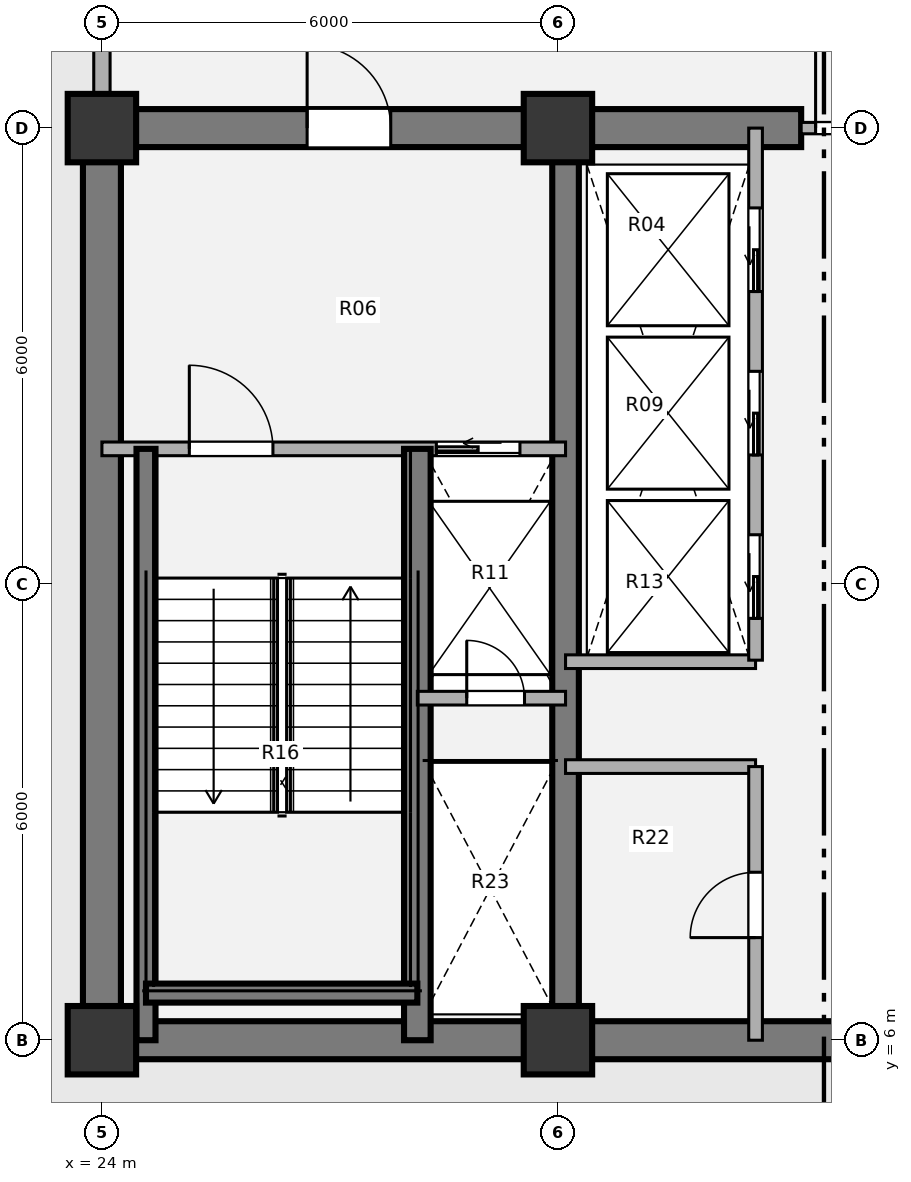
"""IFC4 building model, lengths in metres.
Left out: names, types, materials, properties, quantities, classifications, styles, units other than length and angle.
Written with IfcOpenShell. Run it as: python <this file> out.ifc"""

import sys

from ifc_helpers import new_model, si_unit, direction, frame, frame_2d, origin, origin_2d, place, context, subcontext, project, spatial, rectangle, extrude, source, transform, mapped, element, fill, save


model = new_model("IFC4")
c1 = context("Model", 3, precision=1e-05, world=origin(), true_north=direction((0.0, 1.0)))
c2 = subcontext(c1, "Body", "Model", "MODEL_VIEW")
j1 = project(units=[si_unit("LENGTHUNIT", "METRE"), si_unit("PLANEANGLEUNIT", "RADIAN")], contexts=[c1])
p1 = place(None, origin())
s1 = spatial("IfcSite", under=j1, at=p1, CompositionType="ELEMENT")
p2 = place(p1, origin())
s2 = spatial("IfcBuilding", under=s1, at=p2, CompositionType="ELEMENT")
p3 = place(p2, frame((0.0, 0.0, 85.32)))
s3 = spatial("IfcBuildingStorey", under=s2, at=p3, CompositionType="ELEMENT", Elevation=85.32)
m1 = source(origin(), c2, "Body", "SweptSolid", [
    extrude(rectangle(XDim=0.9, YDim=0.9, at=origin_2d()), origin(), (0.0, 0.0, 1.0), 4.5),
])
for number, where, z_axis, x_axis in (
    (1, (24.0, 6.0, 0.0), (0.0, 0.0, 1.0), (1.0, 0.0, 0.0)),
    (2, (30.0, 6.0, 0.0), (0.0, 0.0, 1.0), (1.0, 0.0, 0.0)),
    (3, (24.0, 18.0, 0.0), (0.0, 0.0, 1.0), (1.0, 0.0, 0.0)),
    (4, (30.0, 18.0, 0.0), (0.0, 0.0, 1.0), (1.0, 0.0, 0.0)),
):
    element("IfcColumn", number, at=place(p3, frame(where, z_axis=z_axis, x_axis=x_axis)), inside=s3, PredefinedType="COLUMN", context=c2, shape_type="MappedRepresentation", body=[
        mapped(m1, transform((0.0, 0.0, 0.0), x_axis=(1.0, 0.0, 0.0), y_axis=(0.0, 1.0, 0.0), z_axis=(0.0, 0.0, 1.0), scale=1.0)),
    ])
p4 = place(p3, frame((48.25, 6.0, 0.0), z_axis=(0.0, 0.0, 1.0), x_axis=(-1.0, 0.0, 0.0)))
e5 = element("IfcWall", 5, at=p4, inside=s3, PredefinedType="SHEAR", context=c2, shape_type="SweptSolid", body=[
    extrude(rectangle(XDim=24.5, YDim=0.5, at=frame_2d((12.25, 0.0))), origin(), (0.0, 0.0, 1.0), 4.5),
])
p5 = place(p3, frame((24.0, 6.0, 0.0), z_axis=(0.0, 0.0, 1.0), x_axis=(0.0, 1.0, 0.0)))
e6 = element("IfcWall", 6, at=p5, inside=s3, PredefinedType="SHEAR", context=c2, shape_type="SweptSolid", body=[
    extrude(rectangle(XDim=12.0, YDim=0.5, at=frame_2d((6.0, 0.0))), origin(), (0.0, 0.0, 1.0), 4.5),
])
p6 = place(p3, frame((23.75, 18.0, 0.0), z_axis=(0.0, 0.0, 1.0), x_axis=(1.0, 0.0, 0.0)))
e7 = element("IfcWall", 7, at=p6, inside=s3, PredefinedType="SHEAR", context=c2, shape_type="SweptSolid", body=[
    extrude(rectangle(XDim=9.45, YDim=0.5, at=frame_2d((4.725, 0.0))), origin(), (0.0, 0.0, 1.0), 4.5),
])
p7 = place(p6, frame((2.95, 0.0, 0.0)))
e8 = element("IfcOpeningElement", 8, at=p7, cuts=e7, PredefinedType="OPENING", context=c2, shape_type="SweptSolid", body=[
    extrude(rectangle(XDim=1.1, YDim=2.1, at=origin_2d()), frame((0.55, 0.26, 1.05), z_axis=(0.0, -1.0, 0.0), x_axis=(1.0, 0.0, 0.0)), (0.0, 0.0, 1.0), 0.52),
])
p8 = place(p3, frame((30.1, 6.0, 0.0), z_axis=(0.0, 0.0, 1.0), x_axis=(0.0, 1.0, 0.0)))
e9 = element("IfcWall", 9, at=p8, inside=s3, PredefinedType="SHEAR", context=c2, shape_type="SweptSolid", body=[
    extrude(rectangle(XDim=12.0, YDim=0.35, at=frame_2d((6.0, 0.0))), origin(), (0.0, 0.0, 1.0), 4.5),
])
p9 = place(p3, frame((24.0, 18.43, 0.0), z_axis=(0.0, 0.0, 1.0), x_axis=(0.0, 1.0, 0.0)))
e10 = element("IfcWall", 10, at=p9, inside=s3, PredefinedType="SOLIDWALL", context=c2, shape_type="SweptSolid", body=[
    extrude(rectangle(XDim=2.62, YDim=0.215, at=frame_2d((1.31, 0.0))), origin(), (0.0, 0.0, 1.0), 4.092),
])
for number, where, z_axis, x_axis in (
    (11, (30.1, 10.98, 0.0), (0.0, 0.0, 1.0), (1.0, 0.0, 0.0)),
    (12, (30.1, 9.6, 0.0), (0.0, 0.0, 1.0), (1.0, 0.0, 0.0)),
):
    element("IfcWall", number, at=place(p3, frame(where, z_axis=z_axis, x_axis=x_axis)), inside=s3, PredefinedType="PARTITIONING", context=c2, shape_type="SweptSolid", body=[
        extrude(rectangle(XDim=2.5, YDim=0.18, at=frame_2d((1.25, 0.0))), origin(), (0.0, 0.0, 1.0), 4.062),
    ])
p10 = place(p3, frame((32.6, 6.0, 0.0), z_axis=(0.0, 0.0, 1.0), x_axis=(0.0, 1.0, 0.0)))
e13 = element("IfcWall", 13, at=p10, inside=s3, PredefinedType="PARTITIONING", context=c2, shape_type="SweptSolid", body=[
    extrude(rectangle(XDim=3.6, YDim=0.18, at=frame_2d((1.8, 0.0))), origin(), (0.0, 0.0, 1.0), 4.062),
])
p11 = place(p10, frame((1.35, 0.0, 0.0)))
e14 = element("IfcOpeningElement", 14, at=p11, cuts=e13, PredefinedType="OPENING", context=c2, shape_type="SweptSolid", body=[
    extrude(rectangle(XDim=0.86, YDim=2.1, at=origin_2d()), frame((0.43, 0.1, 1.05), z_axis=(0.0, -1.0, 0.0), x_axis=(1.0, 0.0, 0.0)), (0.0, 0.0, 1.0), 0.2),
])
p12 = place(p3, frame((33.2, 18.0, 0.0), z_axis=(0.0, 0.0, 1.0), x_axis=(1.0, 0.0, 0.0)))
e15 = element("IfcWall", 15, at=p12, inside=s3, PredefinedType="PARTITIONING", context=c2, shape_type="SweptSolid", body=[
    extrude(rectangle(XDim=5.6, YDim=0.15, at=frame_2d((2.8, 0.0))), origin(), (0.0, 0.0, 1.0), 2.877),
])
p13 = place(p12, frame((0.19, 0.0, 0.0)))
e16 = element("IfcOpeningElement", 16, at=p13, cuts=e15, PredefinedType="OPENING", context=c2, shape_type="SweptSolid", body=[
    extrude(rectangle(XDim=1.1, YDim=2.1, at=origin_2d()), frame((0.55, 0.085, 1.05), z_axis=(0.0, -1.0, 0.0), x_axis=(1.0, 0.0, 0.0)), (0.0, 0.0, 1.0), 0.17),
])
p14 = place(p12, frame((4.31, 0.0, 0.0)))
e17 = element("IfcOpeningElement", 17, at=p14, cuts=e15, PredefinedType="OPENING", context=c2, shape_type="SweptSolid", body=[
    extrude(rectangle(XDim=1.1, YDim=2.1, at=origin_2d()), frame((0.55, 0.085, 1.05), z_axis=(0.0, -1.0, 0.0), x_axis=(1.0, 0.0, 0.0)), (0.0, 0.0, 1.0), 0.17),
])
p15 = place(p3, frame((24.0, 13.78, 0.0), z_axis=(0.0, 0.0, 1.0), x_axis=(1.0, 0.0, 0.0)))
e18 = element("IfcWall", 18, at=p15, inside=s3, PredefinedType="PARTITIONING", context=c2, shape_type="SweptSolid", body=[
    extrude(rectangle(XDim=6.1, YDim=0.18, at=frame_2d((3.05, 0.0))), origin(), (0.0, 0.0, 1.0), 4.062),
])
p16 = place(p15, frame((1.15, 0.0, 0.0)))
e19 = element("IfcOpeningElement", 19, at=p16, cuts=e18, PredefinedType="OPENING", context=c2, shape_type="SweptSolid", body=[
    extrude(rectangle(XDim=1.1, YDim=2.1, at=origin_2d()), frame((0.55, 0.1, 1.05), z_axis=(0.0, -1.0, 0.0), x_axis=(1.0, 0.0, 0.0)), (0.0, 0.0, 1.0), 0.2),
])
p17 = place(p15, frame((4.4, 0.0, 0.0)))
e20 = element("IfcOpeningElement", 20, at=p17, cuts=e18, PredefinedType="OPENING", context=c2, shape_type="SweptSolid", body=[
    extrude(rectangle(XDim=1.1, YDim=2.1, at=origin_2d()), frame((0.55, 0.1, 1.05), z_axis=(0.0, -1.0, 0.0), x_axis=(1.0, 0.0, 0.0)), (0.0, 0.0, 1.0), 0.2),
])
p18 = place(p3, frame((28.15, 6.0, 0.0), z_axis=(0.0, 0.0, 1.0), x_axis=(0.0, 1.0, 0.0)))
e21 = element("IfcWall", 21, at=p18, inside=s3, PredefinedType="SHEAR", context=c2, shape_type="SweptSolid", body=[
    extrude(rectangle(XDim=7.78, YDim=0.35, at=frame_2d((3.89, 0.0))), origin(), (0.0, 0.0, 1.0), 4.412),
])
p19 = place(p3, frame((24.58, 6.0, 0.0), z_axis=(0.0, 0.0, 1.0), x_axis=(0.0, 1.0, 0.0)))
e22 = element("IfcWall", 22, at=p19, inside=s3, PredefinedType="SHEAR", context=c2, shape_type="SweptSolid", body=[
    extrude(rectangle(XDim=7.78, YDim=0.25, at=frame_2d((3.89, 0.0))), origin(), (0.0, 0.0, 1.0), 4.412),
])
p20 = place(p3, frame((24.58, 6.62, 0.0), z_axis=(0.0, 0.0, 1.0), x_axis=(1.0, 0.0, 0.0)))
e23 = element("IfcWall", 23, at=p20, inside=s3, PredefinedType="SHEAR", context=c2, shape_type="SweptSolid", body=[
    extrude(rectangle(XDim=3.57, YDim=0.25, at=frame_2d((1.785, 0.0))), origin(), (0.0, 0.0, 1.0), 4.412),
])
p21 = place(p3, frame((28.15, 10.5, 0.0), z_axis=(0.0, 0.0, 1.0), x_axis=(1.0, 0.0, 0.0)))
e24 = element("IfcWall", 24, at=p21, inside=s3, PredefinedType="PARTITIONING", context=c2, shape_type="SweptSolid", body=[
    extrude(rectangle(XDim=1.95, YDim=0.18, at=frame_2d((0.975, 0.0))), origin(), (0.0, 0.0, 1.0), 4.062),
])
p22 = place(p21, frame((0.65, 0.0, 0.0)))
e25 = element("IfcOpeningElement", 25, at=p22, cuts=e24, PredefinedType="OPENING", context=c2, shape_type="SweptSolid", body=[
    extrude(rectangle(XDim=0.76, YDim=2.05, at=origin_2d()), frame((0.38, 0.1, 1.025), z_axis=(0.0, -1.0, 0.0), x_axis=(1.0, 0.0, 0.0)), (0.0, 0.0, 1.0), 0.2),
])
p23 = place(p3, frame((32.6, 11.0, 0.0), z_axis=(0.0, 0.0, 1.0), x_axis=(0.0, 1.0, 0.0)))
e26 = element("IfcWall", 26, at=p23, inside=s3, PredefinedType="PARTITIONING", context=c2, shape_type="SweptSolid", body=[
    extrude(rectangle(XDim=7.0, YDim=0.18, at=frame_2d((3.5, 0.0))), origin(), (0.0, 0.0, 1.0), 4.062),
])
p24 = place(p23, frame((0.55, 0.0, 0.0)))
e27 = element("IfcOpeningElement", 27, at=p24, cuts=e26, PredefinedType="OPENING", context=c2, shape_type="SweptSolid", body=[
    extrude(rectangle(XDim=1.1, YDim=2.1, at=origin_2d()), frame((0.55, 0.1, 1.05), z_axis=(0.0, -1.0, 0.0), x_axis=(1.0, 0.0, 0.0)), (0.0, 0.0, 1.0), 0.2),
])
p25 = place(p23, frame((2.7, 0.0, 0.0)))
e28 = element("IfcOpeningElement", 28, at=p25, cuts=e26, PredefinedType="OPENING", context=c2, shape_type="SweptSolid", body=[
    extrude(rectangle(XDim=1.1, YDim=2.1, at=origin_2d()), frame((0.55, 0.1, 1.05), z_axis=(0.0, -1.0, 0.0), x_axis=(1.0, 0.0, 0.0)), (0.0, 0.0, 1.0), 0.2),
])
p26 = place(p23, frame((4.85, 0.0, 0.0)))
e29 = element("IfcOpeningElement", 29, at=p26, cuts=e26, PredefinedType="OPENING", context=c2, shape_type="SweptSolid", body=[
    extrude(rectangle(XDim=1.1, YDim=2.1, at=origin_2d()), frame((0.55, 0.1, 1.05), z_axis=(0.0, -1.0, 0.0), x_axis=(1.0, 0.0, 0.0)), (0.0, 0.0, 1.0), 0.2),
])
m2 = source(origin(), c2, "Body", "SweptSolid", [
    extrude(rectangle(XDim=0.86, YDim=2.1, at=origin_2d()), frame((0.43, 0.025, 1.05), z_axis=(0.0, -1.0, 0.0), x_axis=(1.0, 0.0, 0.0)), (0.0, 0.0, 1.0), 0.05),
])
p27 = place(p11, origin())
e30 = element("IfcDoor", 30, at=p27, inside=s3, OperationType="SINGLE_SWING_LEFT", PredefinedType="DOOR", context=c2, shape_type="MappedRepresentation", body=[
    mapped(m2, transform((0.0, 0.0, 0.0), x_axis=(1.0, 0.0, 0.0), y_axis=(0.0, 1.0, 0.0), z_axis=(0.0, 0.0, 1.0), scale=1.0)),
])
fill(e14, e30)
m3 = source(origin(), c2, "Body", "SweptSolid", [
    extrude(rectangle(XDim=1.1, YDim=2.1, at=origin_2d()), frame((0.55, 0.025, 1.05), z_axis=(0.0, -1.0, 0.0), x_axis=(1.0, 0.0, 0.0)), (0.0, 0.0, 1.0), 0.05),
])
p28 = place(p13, origin())
e31 = element("IfcDoor", 31, at=p28, inside=s3, OperationType="SINGLE_SWING_LEFT", PredefinedType="DOOR", context=c2, shape_type="MappedRepresentation", body=[
    mapped(m3, transform((0.0, 0.0, 0.0), x_axis=(1.0, 0.0, 0.0), y_axis=(0.0, 1.0, 0.0), z_axis=(0.0, 0.0, 1.0), scale=1.0)),
])
fill(e16, e31)
m4 = source(origin(), c2, "Body", "SweptSolid", [
    extrude(rectangle(XDim=1.1, YDim=2.1, at=origin_2d()), frame((0.55, 0.025, 1.05), z_axis=(0.0, -1.0, 0.0), x_axis=(1.0, 0.0, 0.0)), (0.0, 0.0, 1.0), 0.05),
])
p29 = place(p16, origin())
e32 = element("IfcDoor", 32, at=p29, inside=s3, OperationType="SINGLE_SWING_LEFT", PredefinedType="DOOR", context=c2, shape_type="MappedRepresentation", body=[
    mapped(m4, transform((0.0, 0.0, 0.0), x_axis=(1.0, 0.0, 0.0), y_axis=(0.0, 1.0, 0.0), z_axis=(0.0, 0.0, 1.0), scale=1.0)),
])
fill(e19, e32)
m5 = source(origin(), c2, "Body", "SweptSolid", [
    extrude(rectangle(XDim=1.1, YDim=2.1, at=origin_2d()), frame((0.55, 0.025, 1.05), z_axis=(0.0, -1.0, 0.0), x_axis=(1.0, 0.0, 0.0)), (0.0, 0.0, 1.0), 0.05),
])
p30 = place(p17, origin())
e33 = element("IfcDoor", 33, at=p30, inside=s3, OperationType="SLIDING_TO_LEFT", PredefinedType="DOOR", context=c2, shape_type="MappedRepresentation", body=[
    mapped(m5, transform((0.0, 0.0, 0.0), x_axis=(1.0, 0.0, 0.0), y_axis=(0.0, 1.0, 0.0), z_axis=(0.0, 0.0, 1.0), scale=1.0)),
])
fill(e20, e33)
m6 = source(origin(), c2, "Body", "SweptSolid", [
    extrude(rectangle(XDim=0.76, YDim=2.05, at=origin_2d()), frame((0.38, 0.025, 1.025), z_axis=(0.0, -1.0, 0.0), x_axis=(1.0, 0.0, 0.0)), (0.0, 0.0, 1.0), 0.05),
])
p31 = place(p22, origin())
e34 = element("IfcDoor", 34, at=p31, inside=s3, OperationType="SINGLE_SWING_LEFT", PredefinedType="DOOR", context=c2, shape_type="MappedRepresentation", body=[
    mapped(m6, transform((0.0, 0.0, 0.0), x_axis=(1.0, 0.0, 0.0), y_axis=(0.0, 1.0, 0.0), z_axis=(0.0, 0.0, 1.0), scale=1.0)),
])
fill(e25, e34)
p32 = place(p7, origin())
e35 = element("IfcDoor", 35, at=p32, inside=s3, OperationType="SINGLE_SWING_LEFT", PredefinedType="DOOR", context=c2, shape_type="MappedRepresentation", body=[
    mapped(m3, transform((0.0, 0.0, 0.0), x_axis=(1.0, 0.0, 0.0), y_axis=(0.0, 1.0, 0.0), z_axis=(0.0, 0.0, 1.0), scale=1.0)),
])
fill(e8, e35)
p33 = place(p24, origin())
e36 = element("IfcDoor", 36, at=p33, inside=s3, OperationType="SLIDING_TO_LEFT", PredefinedType="DOOR", context=c2, shape_type="MappedRepresentation", body=[
    mapped(m5, transform((0.0, 0.0, 0.0), x_axis=(1.0, 0.0, 0.0), y_axis=(0.0, 1.0, 0.0), z_axis=(0.0, 0.0, 1.0), scale=1.0)),
])
fill(e27, e36)
p34 = place(p25, origin())
e37 = element("IfcDoor", 37, at=p34, inside=s3, OperationType="SLIDING_TO_LEFT", PredefinedType="DOOR", context=c2, shape_type="MappedRepresentation", body=[
    mapped(m5, transform((0.0, 0.0, 0.0), x_axis=(1.0, 0.0, 0.0), y_axis=(0.0, 1.0, 0.0), z_axis=(0.0, 0.0, 1.0), scale=1.0)),
])
fill(e28, e37)
p35 = place(p26, origin())
e38 = element("IfcDoor", 38, at=p35, inside=s3, OperationType="SLIDING_TO_LEFT", PredefinedType="DOOR", context=c2, shape_type="MappedRepresentation", body=[
    mapped(m5, transform((0.0, 0.0, 0.0), x_axis=(1.0, 0.0, 0.0), y_axis=(0.0, 1.0, 0.0), z_axis=(0.0, 0.0, 1.0), scale=1.0)),
])
fill(e29, e38)
save(model, sys.argv[1])
